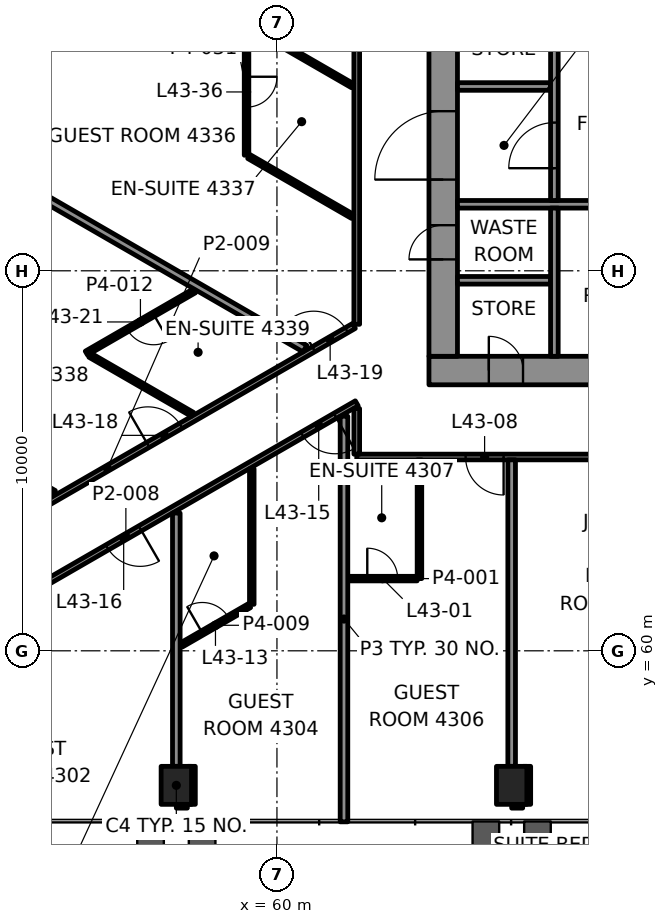
"""IFC4 building model, lengths in metres.
Left out: names, types, materials, properties, quantities, classifications, styles, units other than length and angle.
Written with IfcOpenShell. Run it as: python <this file> out.ifc"""

import sys

from ifc_helpers import new_model, si_unit, direction, frame, frame_2d, origin, origin_2d, place, context, subcontext, project, spatial, rectangle, hollow_rectangle, extrude, element, fill, save


model = new_model("IFC4")
c1 = context("Model", 3, precision=1e-05, world=origin(), true_north=direction((0.0, 1.0)))
c2 = subcontext(c1, "Body", "Model", "MODEL_VIEW")
j1 = project(units=[si_unit("LENGTHUNIT", "METRE"), si_unit("PLANEANGLEUNIT", "RADIAN")], contexts=[c1])
p1 = place(None, origin())
s1 = spatial("IfcSite", under=j1, at=p1, CompositionType="ELEMENT")
p2 = place(p1, origin())
s2 = spatial("IfcBuilding", under=s1, at=p2, CompositionType="ELEMENT")
p3 = place(p2, frame((0.0, 0.0, 187.0)))
s3 = spatial("IfcBuildingStorey", under=s2, at=p3, CompositionType="ELEMENT", Elevation=187.0)
for number, where, z_axis, x_axis in (
    (1, (57.352, 56.46, -0.0), (0.0, 0.0, 1.0), (1.0, 0.0, 0.0)),
    (2, (66.176, 56.46, -0.0), (0.0, 0.0, 1.0), (1.0, 0.0, 0.0)),
):
    element("IfcColumn", number, at=place(p3, frame(where, z_axis=z_axis, x_axis=x_axis)), inside=s3, PredefinedType="COLUMN", context=c2, shape_type="SweptSolid", body=[
        extrude(hollow_rectangle(XDim=0.8, YDim=1.0, WallThickness=0.05, at=origin_2d()), origin(), (0.0, 0.0, 1.0), 3.9),
    ])
p4 = place(p3, frame((64.0, 67.375, 0.0), z_axis=(0.0, 0.0, 1.0), x_axis=(1.0, 0.0, 0.0)))
e3 = element("IfcWall", 3, at=p4, inside=s3, PredefinedType="SHEAR", context=c2, shape_type="SweptSolid", body=[
    extrude(rectangle(XDim=22.0, YDim=0.75, at=frame_2d((11.0, 0.0))), origin(), (0.0, 0.0, 1.0), 3.7),
])
p5 = place(p4, frame((1.575, 0.0, 0.0)))
e4 = element("IfcOpeningElement", 4, at=p5, cuts=e3, PredefinedType="OPENING", context=c2, shape_type="SweptSolid", body=[
    extrude(rectangle(XDim=0.9, YDim=2.1, at=frame_2d((0.45, 1.05))), frame((0.0, 0.385, 0.0), z_axis=(0.0, -1.0, 0.0), x_axis=(1.0, 0.0, 0.0)), (0.0, 0.0, 1.0), 0.77),
])
p6 = place(p4, frame((4.425, 0.0, 0.0)))
e5 = element("IfcOpeningElement", 5, at=p6, cuts=e3, PredefinedType="OPENING", context=c2, shape_type="SweptSolid", body=[
    extrude(rectangle(XDim=0.9, YDim=2.1, at=frame_2d((0.45, 1.05))), frame((0.0, 0.385, 0.0), z_axis=(0.0, -1.0, 0.0), x_axis=(1.0, 0.0, 0.0)), (0.0, 0.0, 1.0), 0.77),
])
p7 = place(p3, frame((64.375, 67.75, 0.0), z_axis=(0.0, 0.0, 1.0), x_axis=(0.0, 1.0, 0.0)))
e6 = element("IfcWall", 6, at=p7, inside=s3, PredefinedType="SHEAR", context=c2, shape_type="SweptSolid", body=[
    extrude(rectangle(XDim=14.5, YDim=0.75, at=frame_2d((7.25, 0.0))), origin(), (0.0, 0.0, 1.0), 3.7),
])
p8 = place(p7, frame((4.65, 0.0, 0.0)))
e7 = element("IfcOpeningElement", 7, at=p8, cuts=e6, PredefinedType="OPENING", context=c2, shape_type="SweptSolid", body=[
    extrude(rectangle(XDim=1.8, YDim=2.1, at=frame_2d((0.9, 1.05))), frame((0.0, 0.385, 0.0), z_axis=(0.0, -1.0, 0.0), x_axis=(1.0, 0.0, 0.0)), (0.0, 0.0, 1.0), 0.77),
])
p9 = place(p7, frame((2.55, 0.0, 0.0)))
e8 = element("IfcOpeningElement", 8, at=p9, cuts=e6, PredefinedType="OPENING", context=c2, shape_type="SweptSolid", body=[
    extrude(rectangle(XDim=0.9, YDim=2.1, at=frame_2d((0.45, 1.05))), frame((0.0, 0.385, 0.0), z_axis=(0.0, -1.0, 0.0), x_axis=(1.0, 0.0, 0.0)), (0.0, 0.0, 1.0), 0.77),
])
p10 = place(p7, frame((10.35, 0.0, 0.0)))
e9 = element("IfcOpeningElement", 9, at=p10, cuts=e6, PredefinedType="OPENING", context=c2, shape_type="SweptSolid", body=[
    extrude(rectangle(XDim=0.9, YDim=2.1, at=frame_2d((0.45, 1.05))), frame((0.0, 0.385, 0.0), z_axis=(0.0, -1.0, 0.0), x_axis=(1.0, 0.0, 0.0)), (0.0, 0.0, 1.0), 0.77),
])
for number, where, z_axis, x_axis in (
    (10, (57.352, 55.96, 0.0), (0.0, 0.0, 1.0), (1.0, 0.0, 0.0)),
    (11, (66.176, 55.96, 0.0), (0.0, 0.0, 1.0), (1.0, 0.0, 0.0)),
):
    element("IfcWall", number, at=place(p3, frame(where, z_axis=z_axis, x_axis=x_axis)), inside=s3, PredefinedType="PARTITIONING", context=c2, shape_type="SweptSolid", body=[
        extrude(rectangle(XDim=0.29, YDim=0.2, at=frame_2d((0.145, 0.0))), origin(), (0.0, 0.0, 1.0), 3.1),
    ])
p11 = place(p3, frame((61.864, 61.9, 0.0), z_axis=(0.0, 0.0, 1.0), x_axis=(1.0, 0.0, 0.0)))
e12 = element("IfcWall", 12, at=p11, inside=s3, PredefinedType="PARTITIONING", context=c2, shape_type="SweptSolid", body=[
    extrude(rectangle(XDim=1.825, YDim=0.12, at=frame_2d((0.913, 0.0))), origin(), (0.0, 0.0, 1.0), 3.1),
])
p12 = place(p11, frame((0.513, 0.0, 0.0)))
e13 = element("IfcOpeningElement", 13, at=p12, cuts=e12, PredefinedType="OPENING", context=c2, shape_type="SweptSolid", body=[
    extrude(rectangle(XDim=0.8, YDim=2.1, at=frame_2d((0.4, 1.05))), frame((0.0, 0.07, 0.0), z_axis=(0.0, -1.0, 0.0), x_axis=(1.0, 0.0, 0.0)), (0.0, 0.0, 1.0), 0.14),
])
p13 = place(p3, frame((87.9, 65.1, 0.0), z_axis=(0.0, 0.0, 1.0), x_axis=(-1.0, 0.0, 0.0)))
e14 = element("IfcWall", 14, at=p13, inside=s3, PredefinedType="PARTITIONING", context=c2, shape_type="SweptSolid", body=[
    extrude(rectangle(XDim=25.8, YDim=0.15, at=frame_2d((12.9, 0.0))), origin(), (0.0, 0.0, 1.0), 3.1),
])
p14 = place(p13, frame((2.264, 0.0, 0.0)))
e15 = element("IfcOpeningElement", 15, at=p14, cuts=e14, PredefinedType="OPENING", context=c2, shape_type="SweptSolid", body=[
    extrude(rectangle(XDim=1.0, YDim=2.1, at=frame_2d((0.5, 1.05))), frame((0.0, 0.085, 0.0), z_axis=(0.0, -1.0, 0.0), x_axis=(1.0, 0.0, 0.0)), (0.0, 0.0, 1.0), 0.17),
])
p15 = place(p13, frame((10.244, 0.0, 0.0)))
e16 = element("IfcOpeningElement", 16, at=p15, cuts=e14, PredefinedType="OPENING", context=c2, shape_type="SweptSolid", body=[
    extrude(rectangle(XDim=0.9, YDim=2.1, at=frame_2d((0.45, 1.05))), frame((0.0, 0.085, 0.0), z_axis=(0.0, -1.0, 0.0), x_axis=(1.0, 0.0, 0.0)), (0.0, 0.0, 1.0), 0.17),
])
p16 = place(p13, frame((18.135, 0.0, 0.0)))
e17 = element("IfcOpeningElement", 17, at=p16, cuts=e14, PredefinedType="OPENING", context=c2, shape_type="SweptSolid", body=[
    extrude(rectangle(XDim=1.0, YDim=2.1, at=frame_2d((0.5, 1.05))), frame((0.0, 0.085, 0.0), z_axis=(0.0, -1.0, 0.0), x_axis=(1.0, 0.0, 0.0)), (0.0, 0.0, 1.0), 0.17),
])
p17 = place(p13, frame((21.936, 0.0, 0.0)))
e18 = element("IfcOpeningElement", 18, at=p17, cuts=e14, PredefinedType="OPENING", context=c2, shape_type="SweptSolid", body=[
    extrude(rectangle(XDim=1.0, YDim=2.1, at=frame_2d((0.5, 1.05))), frame((0.0, 0.085, 0.0), z_axis=(0.0, -1.0, 0.0), x_axis=(1.0, 0.0, 0.0)), (0.0, 0.0, 1.0), 0.17),
])
p18 = place(p3, frame((57.487, 60.155, 0.0), z_axis=(0.0, 0.0, 1.0), x_axis=(0.866018462269, 0.500012022864, 0.0)))
e19 = element("IfcWall", 19, at=p18, inside=s3, PredefinedType="PARTITIONING", context=c2, shape_type="SweptSolid", body=[
    extrude(rectangle(XDim=2.068, YDim=0.12, at=frame_2d((1.034, 0.0))), origin(), (0.0, 0.0, 1.0), 3.1),
])
p19 = place(p18, frame((0.634, 0.0, 0.0)))
e20 = element("IfcOpeningElement", 20, at=p19, cuts=e19, PredefinedType="OPENING", context=c2, shape_type="SweptSolid", body=[
    extrude(rectangle(XDim=0.8, YDim=2.1, at=frame_2d((0.4, 1.05))), frame((0.0, 0.07, 0.0), z_axis=(0.0, -1.0, 0.0), x_axis=(1.0, 0.0, 0.0)), (0.0, 0.0, 1.0), 0.14),
])
p20 = place(p3, frame((62.1, 66.513, 0.0), z_axis=(0.0, 0.0, 1.0), x_axis=(-0.866025334814, -0.500000119461, 0.0)))
e21 = element("IfcWall", 21, at=p20, inside=s3, PredefinedType="PARTITIONING", context=c2, shape_type="SweptSolid", body=[
    extrude(rectangle(XDim=14.03, YDim=0.15, at=frame_2d((7.015, 0.0))), origin(), (0.0, 0.0, 1.0), 2.947),
])
p21 = place(p20, frame((0.656, 0.0, 0.0)))
e22 = element("IfcOpeningElement", 22, at=p21, cuts=e21, PredefinedType="OPENING", context=c2, shape_type="SweptSolid", body=[
    extrude(rectangle(XDim=1.0, YDim=2.1, at=frame_2d((0.5, 1.05))), frame((0.0, 0.085, 0.0), z_axis=(0.0, -1.0, 0.0), x_axis=(1.0, 0.0, 0.0)), (0.0, 0.0, 1.0), 0.17),
])
p22 = place(p20, frame((6.582, 0.0, 0.0)))
e23 = element("IfcOpeningElement", 23, at=p22, cuts=e21, PredefinedType="OPENING", context=c2, shape_type="SweptSolid", body=[
    extrude(rectangle(XDim=1.0, YDim=2.1, at=frame_2d((0.5, 1.05))), frame((0.0, 0.085, 0.0), z_axis=(0.0, -1.0, 0.0), x_axis=(1.0, 0.0, 0.0)), (0.0, 0.0, 1.0), 0.17),
])
p23 = place(p3, frame((49.05, 61.057, 0.0), z_axis=(0.0, 0.0, 1.0), x_axis=(0.866027379905, 0.499996577244, 0.0)))
e24 = element("IfcWall", 24, at=p23, inside=s3, PredefinedType="PARTITIONING", context=c2, shape_type="SweptSolid", body=[
    extrude(rectangle(XDim=14.982, YDim=0.15, at=frame_2d((7.491, 0.0))), origin(), (0.0, 0.0, 1.0), 3.1),
])
p24 = place(p23, frame((0.532, 0.0, 0.0)))
e25 = element("IfcOpeningElement", 25, at=p24, cuts=e24, PredefinedType="OPENING", context=c2, shape_type="SweptSolid", body=[
    extrude(rectangle(XDim=1.0, YDim=2.1, at=frame_2d((0.5, 1.05))), frame((0.0, 0.085, 0.0), z_axis=(0.0, -1.0, 0.0), x_axis=(1.0, 0.0, 0.0)), (0.0, 0.0, 1.0), 0.17),
])
p25 = place(p23, frame((8.725, 0.0, 0.0)))
e26 = element("IfcOpeningElement", 26, at=p25, cuts=e24, PredefinedType="OPENING", context=c2, shape_type="SweptSolid", body=[
    extrude(rectangle(XDim=1.0, YDim=2.1, at=frame_2d((0.5, 1.05))), frame((0.0, 0.085, 0.0), z_axis=(0.0, -1.0, 0.0), x_axis=(1.0, 0.0, 0.0)), (0.0, 0.0, 1.0), 0.17),
])
p26 = place(p23, frame((13.76, 0.0, 0.0)))
e27 = element("IfcOpeningElement", 27, at=p26, cuts=e24, PredefinedType="OPENING", context=c2, shape_type="SweptSolid", body=[
    extrude(rectangle(XDim=1.0, YDim=2.1, at=frame_2d((0.5, 1.05))), frame((0.0, 0.085, 0.0), z_axis=(0.0, -1.0, 0.0), x_axis=(1.0, 0.0, 0.0)), (0.0, 0.0, 1.0), 0.17),
])
p27 = place(p3, frame((57.83, 69.475, 0.0), z_axis=(0.0, 0.0, 1.0), x_axis=(-0.866038236991, -0.499977771575, 0.0)))
e28 = element("IfcWall", 28, at=p27, inside=s3, PredefinedType="PARTITIONING", context=c2, shape_type="SweptSolid", body=[
    extrude(rectangle(XDim=3.283, YDim=0.12, at=frame_2d((1.642, 0.0))), origin(), (0.0, 0.0, 1.0), 3.1),
])
p28 = place(p27, frame((1.242, 0.0, 0.0)))
e29 = element("IfcOpeningElement", 29, at=p28, cuts=e28, PredefinedType="OPENING", context=c2, shape_type="SweptSolid", body=[
    extrude(rectangle(XDim=0.8, YDim=2.1, at=frame_2d((0.4, 1.05))), frame((0.0, 0.07, 0.0), z_axis=(0.0, -1.0, 0.0), x_axis=(1.0, 0.0, 0.0)), (0.0, 0.0, 1.0), 0.14),
])
p29 = place(p3, frame((66.576, 55.96, 0.0), z_axis=(0.0, 0.0, 1.0), x_axis=(0.0, 1.0, 0.0)))
e30 = element("IfcWall", 30, at=p29, inside=s3, PredefinedType="PARTITIONING", context=c2, shape_type="SweptSolid", body=[
    extrude(rectangle(XDim=1.0, YDim=0.2, at=frame_2d((0.5, 0.0))), origin(), (0.0, 0.0, 1.0), 3.022),
])
p30 = place(p3, frame((66.176, 56.96, 0.0), z_axis=(0.0, 0.0, 1.0), x_axis=(0.0, 1.0, 0.0)))
e31 = element("IfcWall", 31, at=p30, inside=s3, PredefinedType="PARTITIONING", context=c2, shape_type="SweptSolid", body=[
    extrude(rectangle(XDim=8.065, YDim=0.2, at=frame_2d((4.033, 0.0))), origin(), (0.0, 0.0, 1.0), 3.1),
])
p31 = place(p3, frame((63.75, 61.9, 0.0), z_axis=(0.0, 0.0, 1.0), x_axis=(0.0, 1.0, 0.0)))
e32 = element("IfcWall", 32, at=p31, inside=s3, PredefinedType="PARTITIONING", context=c2, shape_type="SweptSolid", body=[
    extrude(rectangle(XDim=3.125, YDim=0.12, at=frame_2d((1.562, 0.0))), origin(), (0.0, 0.0, 1.0), 3.1),
])
p32 = place(p3, frame((62.1, 65.175, 0.0), z_axis=(0.0, 0.0, 1.0), x_axis=(0.0, 1.0, 0.0)))
e33 = element("IfcWall", 33, at=p32, inside=s3, PredefinedType="PARTITIONING", context=c2, shape_type="SweptSolid", body=[
    extrude(rectangle(XDim=1.201, YDim=0.15, at=frame_2d((0.601, 0.0))), origin(), (0.0, 0.0, 1.0), 2.947),
])
p33 = place(p3, frame((62.1, 68.591, 0.0), z_axis=(0.0, 0.0, 1.0), x_axis=(0.0, 1.0, 0.0)))
e34 = element("IfcWall", 34, at=p33, inside=s3, PredefinedType="PARTITIONING", context=c2, shape_type="SweptSolid", body=[
    extrude(rectangle(XDim=16.308, YDim=0.15, at=frame_2d((8.154, 0.0))), origin(), (0.0, 0.0, 1.0), 3.1),
])
p34 = place(p3, frame((61.764, 55.5, 0.0), z_axis=(0.0, 0.0, 1.0), x_axis=(0.0, 1.0, 0.0)))
e35 = element("IfcWall", 35, at=p34, inside=s3, PredefinedType="PARTITIONING", context=c2, shape_type="SweptSolid", body=[
    extrude(rectangle(XDim=10.673, YDim=0.2, at=frame_2d((5.336, 0.0))), origin(), (0.0, 0.0, 1.0), 2.947),
])
p35 = place(p3, frame((59.338, 61.223, 0.0), z_axis=(0.0, 0.0, 1.0), x_axis=(0.0, 1.0, 0.0)))
e36 = element("IfcWall", 36, at=p35, inside=s3, PredefinedType="PARTITIONING", context=c2, shape_type="SweptSolid", body=[
    extrude(rectangle(XDim=3.568, YDim=0.12, at=frame_2d((1.784, 0.0))), origin(), (0.0, 0.0, 1.0), 2.947),
])
p36 = place(p3, frame((59.2, 76.371, 0.0), z_axis=(0.0, 0.0, 1.0), x_axis=(0.0, -1.0, 0.0)))
e37 = element("IfcWall", 37, at=p36, inside=s3, PredefinedType="PARTITIONING", context=c2, shape_type="SweptSolid", body=[
    extrude(rectangle(XDim=3.329, YDim=0.12, at=frame_2d((1.665, 0.0))), origin(), (0.0, 0.0, 1.0), 3.1),
])
p37 = place(p36, frame((1.265, 0.0, 0.0)))
e38 = element("IfcOpeningElement", 38, at=p37, cuts=e37, PredefinedType="OPENING", context=c2, shape_type="SweptSolid", body=[
    extrude(rectangle(XDim=0.8, YDim=2.1, at=frame_2d((0.4, 1.05))), frame((0.0, 0.07, 0.0), z_axis=(0.0, -1.0, 0.0), x_axis=(1.0, 0.0, 0.0)), (0.0, 0.0, 1.0), 0.14),
])
p38 = place(p3, frame((57.752, 55.96, 0.0), z_axis=(0.0, 0.0, 1.0), x_axis=(0.0, 1.0, 0.0)))
e39 = element("IfcWall", 39, at=p38, inside=s3, PredefinedType="PARTITIONING", context=c2, shape_type="SweptSolid", body=[
    extrude(rectangle(XDim=1.0, YDim=0.2, at=frame_2d((0.5, 0.0))), origin(), (0.0, 0.0, 1.0), 3.022),
])
p39 = place(p3, frame((57.352, 56.96, 0.0), z_axis=(0.0, 0.0, 1.0), x_axis=(0.0, 1.0, 0.0)))
e40 = element("IfcWall", 40, at=p39, inside=s3, PredefinedType="PARTITIONING", context=c2, shape_type="SweptSolid", body=[
    extrude(rectangle(XDim=6.666, YDim=0.2, at=frame_2d((3.333, 0.0))), origin(), (0.0, 0.0, 1.0), 3.1),
])
p40 = place(p3, frame((61.99, 74.869, 0.0), z_axis=(0.0, 0.0, 1.0), x_axis=(-0.866025877972, 0.499999178681, 0.0)))
e41 = element("IfcWall", 41, at=p40, inside=s3, PredefinedType="PARTITIONING", context=c2, shape_type="SweptSolid", body=[
    extrude(rectangle(XDim=8.299, YDim=0.12, at=frame_2d((4.149, 0.0))), origin(), (0.0, 0.0, 1.0), 3.022),
])
p41 = place(p3, frame((61.99, 71.431, 0.0), z_axis=(0.0, 0.0, 1.0), x_axis=(-0.866028267601, 0.499995039691, 0.0)))
e42 = element("IfcWall", 42, at=p41, inside=s3, PredefinedType="PARTITIONING", context=c2, shape_type="SweptSolid", body=[
    extrude(rectangle(XDim=3.153, YDim=0.12, at=frame_2d((1.576, 0.0))), origin(), (0.0, 0.0, 1.0), 3.1),
])
p42 = place(p3, frame((60.737, 67.951, 0.0), z_axis=(0.0, 0.0, 1.0), x_axis=(-0.866024451315, 0.500001649722, 0.0)))
e43 = element("IfcWall", 43, at=p42, inside=s3, PredefinedType="PARTITIONING", context=c2, shape_type="SweptSolid", body=[
    extrude(rectangle(XDim=10.673, YDim=0.2, at=frame_2d((5.336, 0.0))), origin(), (0.0, 0.0, 1.0), 3.022),
])
p43 = place(p3, frame((57.776, 66.222, 0.0), z_axis=(0.0, 0.0, 1.0), x_axis=(-0.866009247561, 0.500027982357, 0.0)))
e44 = element("IfcWall", 44, at=p43, inside=s3, PredefinedType="PARTITIONING", context=c2, shape_type="SweptSolid", body=[
    extrude(rectangle(XDim=3.113, YDim=0.12, at=frame_2d((1.556, 0.0))), origin(), (0.0, 0.0, 1.0), 3.1),
])
p44 = place(p3, frame((54.119, 64.13, 0.0), z_axis=(0.0, 0.0, 1.0), x_axis=(-0.866017662945, 0.500013407287, 0.0)))
e45 = element("IfcWall", 45, at=p44, inside=s3, PredefinedType="PARTITIONING", context=c2, shape_type="SweptSolid", body=[
    extrude(rectangle(XDim=6.852, YDim=0.2, at=frame_2d((3.426, 0.0))), origin(), (0.0, 0.0, 1.0), 3.1),
])
p45 = place(p3, frame((64.75, 69.75, 0.0), z_axis=(0.0, 0.0, 1.0), x_axis=(1.0, 0.0, 0.0)))
e46 = element("IfcWall", 46, at=p45, inside=s3, PredefinedType="PARTITIONING", context=c2, shape_type="SweptSolid", body=[
    extrude(rectangle(XDim=2.45, YDim=0.2, at=frame_2d((1.225, 0.0))), origin(), (0.0, 0.0, 1.0), 3.7),
])
p46 = place(p3, frame((64.75, 71.75, 0.0), z_axis=(0.0, 0.0, 1.0), x_axis=(1.0, 0.0, 0.0)))
e47 = element("IfcWall", 47, at=p46, inside=s3, PredefinedType="PARTITIONING", context=c2, shape_type="SweptSolid", body=[
    extrude(rectangle(XDim=5.55, YDim=0.2, at=frame_2d((2.775, 0.0))), origin(), (0.0, 0.0, 1.0), 3.7),
])
p47 = place(p3, frame((64.75, 74.85, 0.0), z_axis=(0.0, 0.0, 1.0), x_axis=(1.0, 0.0, 0.0)))
e48 = element("IfcWall", 48, at=p47, inside=s3, PredefinedType="PARTITIONING", context=c2, shape_type="SweptSolid", body=[
    extrude(rectangle(XDim=2.45, YDim=0.2, at=frame_2d((1.225, 0.0))), origin(), (0.0, 0.0, 1.0), 3.7),
])
p48 = place(p3, frame((67.3, 67.75, 0.0), z_axis=(0.0, 0.0, 1.0), x_axis=(0.0, 1.0, 0.0)))
e49 = element("IfcWall", 49, at=p48, inside=s3, PredefinedType="PARTITIONING", context=c2, shape_type="SweptSolid", body=[
    extrude(rectangle(XDim=3.9, YDim=0.2, at=frame_2d((1.95, 0.0))), origin(), (0.0, 0.0, 1.0), 3.7),
])
p49 = place(p3, frame((67.3, 71.85, 0.0), z_axis=(0.0, 0.0, 1.0), x_axis=(0.0, 1.0, 0.0)))
e50 = element("IfcWall", 50, at=p49, inside=s3, PredefinedType="PARTITIONING", context=c2, shape_type="SweptSolid", body=[
    extrude(rectangle(XDim=5.75, YDim=0.2, at=frame_2d((2.875, 0.0))), origin(), (0.0, 0.0, 1.0), 3.7),
])
p50 = place(p49, frame((0.85, 0.0, 0.0)))
e51 = element("IfcOpeningElement", 51, at=p50, cuts=e50, PredefinedType="OPENING", context=c2, shape_type="SweptSolid", body=[
    extrude(rectangle(XDim=1.2, YDim=2.1, at=frame_2d((0.6, 1.05))), frame((0.0, 0.11, 0.0), z_axis=(0.0, -1.0, 0.0), x_axis=(1.0, 0.0, 0.0)), (0.0, 0.0, 1.0), 0.22),
])
p51 = place(p12, origin())
e52 = element("IfcDoor", 52, at=p51, inside=s3, OperationType="SINGLE_SWING_RIGHT", PredefinedType="DOOR", context=c2, shape_type="SweptSolid", body=[
    extrude(rectangle(XDim=0.8, YDim=2.1, at=frame_2d((0.4, 1.05))), frame((0.0, 0.025, 0.0), z_axis=(0.0, -1.0, 0.0), x_axis=(1.0, 0.0, 0.0)), (0.0, 0.0, 1.0), 0.05),
])
fill(e13, e52)
p52 = place(p17, origin())
e53 = element("IfcDoor", 53, at=p52, inside=s3, OperationType="SINGLE_SWING_RIGHT", PredefinedType="DOOR", context=c2, shape_type="SweptSolid", body=[
    extrude(rectangle(XDim=1.0, YDim=2.1, at=frame_2d((0.5, 1.05))), frame((0.0, 0.025, 0.0), z_axis=(0.0, -1.0, 0.0), x_axis=(1.0, 0.0, 0.0)), (0.0, 0.0, 1.0), 0.05),
])
fill(e18, e53)
p53 = place(p19, origin())
e54 = element("IfcDoor", 54, at=p53, inside=s3, OperationType="SINGLE_SWING_RIGHT", PredefinedType="DOOR", context=c2, shape_type="SweptSolid", body=[
    extrude(rectangle(XDim=0.8, YDim=2.1, at=frame_2d((0.4, 1.05))), frame((0.0, 0.025, 0.0), z_axis=(0.0, -1.0, 0.0), x_axis=(1.0, 0.0, 0.0)), (0.0, 0.0, 1.0), 0.05),
])
fill(e20, e54)
p54 = place(p21, origin())
e55 = element("IfcDoor", 55, at=p54, inside=s3, OperationType="SINGLE_SWING_RIGHT", PredefinedType="DOOR", context=c2, shape_type="SweptSolid", body=[
    extrude(rectangle(XDim=1.0, YDim=2.1, at=frame_2d((0.5, 1.05))), frame((0.0, 0.025, 0.0), z_axis=(0.0, -1.0, 0.0), x_axis=(1.0, 0.0, 0.0)), (0.0, 0.0, 1.0), 0.05),
])
fill(e22, e55)
p55 = place(p22, origin())
e56 = element("IfcDoor", 56, at=p55, inside=s3, OperationType="SINGLE_SWING_RIGHT", PredefinedType="DOOR", context=c2, shape_type="SweptSolid", body=[
    extrude(rectangle(XDim=1.0, YDim=2.1, at=frame_2d((0.5, 1.05))), frame((0.0, 0.025, 0.0), z_axis=(0.0, -1.0, 0.0), x_axis=(1.0, 0.0, 0.0)), (0.0, 0.0, 1.0), 0.05),
])
fill(e23, e56)
p56 = place(p25, origin())
e57 = element("IfcDoor", 57, at=p56, inside=s3, OperationType="SINGLE_SWING_LEFT", PredefinedType="DOOR", context=c2, shape_type="SweptSolid", body=[
    extrude(rectangle(XDim=1.0, YDim=2.1, at=frame_2d((0.5, 1.05))), frame((0.0, 0.025, 0.0), z_axis=(0.0, -1.0, 0.0), x_axis=(1.0, 0.0, 0.0)), (0.0, 0.0, 1.0), 0.05),
])
fill(e26, e57)
p57 = place(p26, origin())
e58 = element("IfcDoor", 58, at=p57, inside=s3, OperationType="SINGLE_SWING_LEFT", PredefinedType="DOOR", context=c2, shape_type="SweptSolid", body=[
    extrude(rectangle(XDim=1.0, YDim=2.1, at=frame_2d((0.5, 1.05))), frame((0.0, 0.025, 0.0), z_axis=(0.0, -1.0, 0.0), x_axis=(1.0, 0.0, 0.0)), (0.0, 0.0, 1.0), 0.05),
])
fill(e27, e58)
p58 = place(p28, origin())
e59 = element("IfcDoor", 59, at=p58, inside=s3, OperationType="SINGLE_SWING_LEFT", PredefinedType="DOOR", context=c2, shape_type="SweptSolid", body=[
    extrude(rectangle(XDim=0.8, YDim=2.1, at=frame_2d((0.4, 1.05))), frame((0.0, 0.025, 0.0), z_axis=(0.0, -1.0, 0.0), x_axis=(1.0, 0.0, 0.0)), (0.0, 0.0, 1.0), 0.05),
])
fill(e29, e59)
p59 = place(p37, origin())
e60 = element("IfcDoor", 60, at=p59, inside=s3, OperationType="SINGLE_SWING_LEFT", PredefinedType="DOOR", context=c2, shape_type="SweptSolid", body=[
    extrude(rectangle(XDim=0.8, YDim=2.1, at=frame_2d((0.4, 1.05))), frame((0.0, 0.025, 0.0), z_axis=(0.0, -1.0, 0.0), x_axis=(1.0, 0.0, 0.0)), (0.0, 0.0, 1.0), 0.05),
])
fill(e38, e60)
p60 = place(p3, origin())
p61 = place(p60, frame((51.471, 55.485, 0.15), z_axis=(0.0, 0.0, 1.0), x_axis=(1.0, 0.0, 0.0)))
p62 = place(p61, origin())
e61 = element("IfcWindow", 61, at=p62, inside=s3, PartitioningType="SINGLE_PANEL", PredefinedType="WINDOW", context=c2, shape_type="SweptSolid", body=[
    extrude(rectangle(XDim=2.866, YDim=3.55, at=frame_2d((1.433, 1.775))), frame((0.0, 0.03, 0.0), z_axis=(0.0, -1.0, 0.0), x_axis=(1.0, 0.0, 0.0)), (0.0, 0.0, 1.0), 0.06),
])
p63 = place(p50, origin())
e62 = element("IfcDoor", 62, at=p63, inside=s3, OperationType="SINGLE_SWING_RIGHT", PredefinedType="DOOR", context=c2, shape_type="SweptSolid", body=[
    extrude(rectangle(XDim=1.2, YDim=2.1, at=frame_2d((0.6, 1.05))), frame((0.0, 0.025, 0.0), z_axis=(0.0, -1.0, 0.0), x_axis=(1.0, 0.0, 0.0)), (0.0, 0.0, 1.0), 0.05),
])
fill(e51, e62)
p64 = place(p8, origin())
e63 = element("IfcDoor", 63, at=p64, inside=s3, OperationType="SINGLE_SWING_LEFT", PredefinedType="DOOR", context=c2, shape_type="SweptSolid", body=[
    extrude(rectangle(XDim=1.8, YDim=2.1, at=frame_2d((0.9, 1.05))), frame((0.0, 0.095, 0.0), z_axis=(0.0, -1.0, 0.0), x_axis=(1.0, 0.0, 0.0)), (0.0, 0.0, 1.0), 0.19),
])
fill(e7, e63)
p65 = place(p5, origin())
e64 = element("IfcDoor", 64, at=p65, inside=s3, OperationType="SINGLE_SWING_LEFT", PredefinedType="DOOR", context=c2, shape_type="SweptSolid", body=[
    extrude(rectangle(XDim=0.9, YDim=2.1, at=frame_2d((0.45, 1.05))), frame((0.0, 0.095, 0.0), z_axis=(0.0, -1.0, 0.0), x_axis=(1.0, 0.0, 0.0)), (0.0, 0.0, 1.0), 0.19),
])
fill(e4, e64)
p66 = place(p9, origin())
e65 = element("IfcDoor", 65, at=p66, inside=s3, OperationType="SINGLE_SWING_RIGHT", PredefinedType="DOOR", context=c2, shape_type="SweptSolid", body=[
    extrude(rectangle(XDim=0.9, YDim=2.1, at=frame_2d((0.45, 1.05))), frame((0.0, 0.095, 0.0), z_axis=(0.0, -1.0, 0.0), x_axis=(1.0, 0.0, 0.0)), (0.0, 0.0, 1.0), 0.19),
])
fill(e8, e65)
save(model, sys.argv[1])
